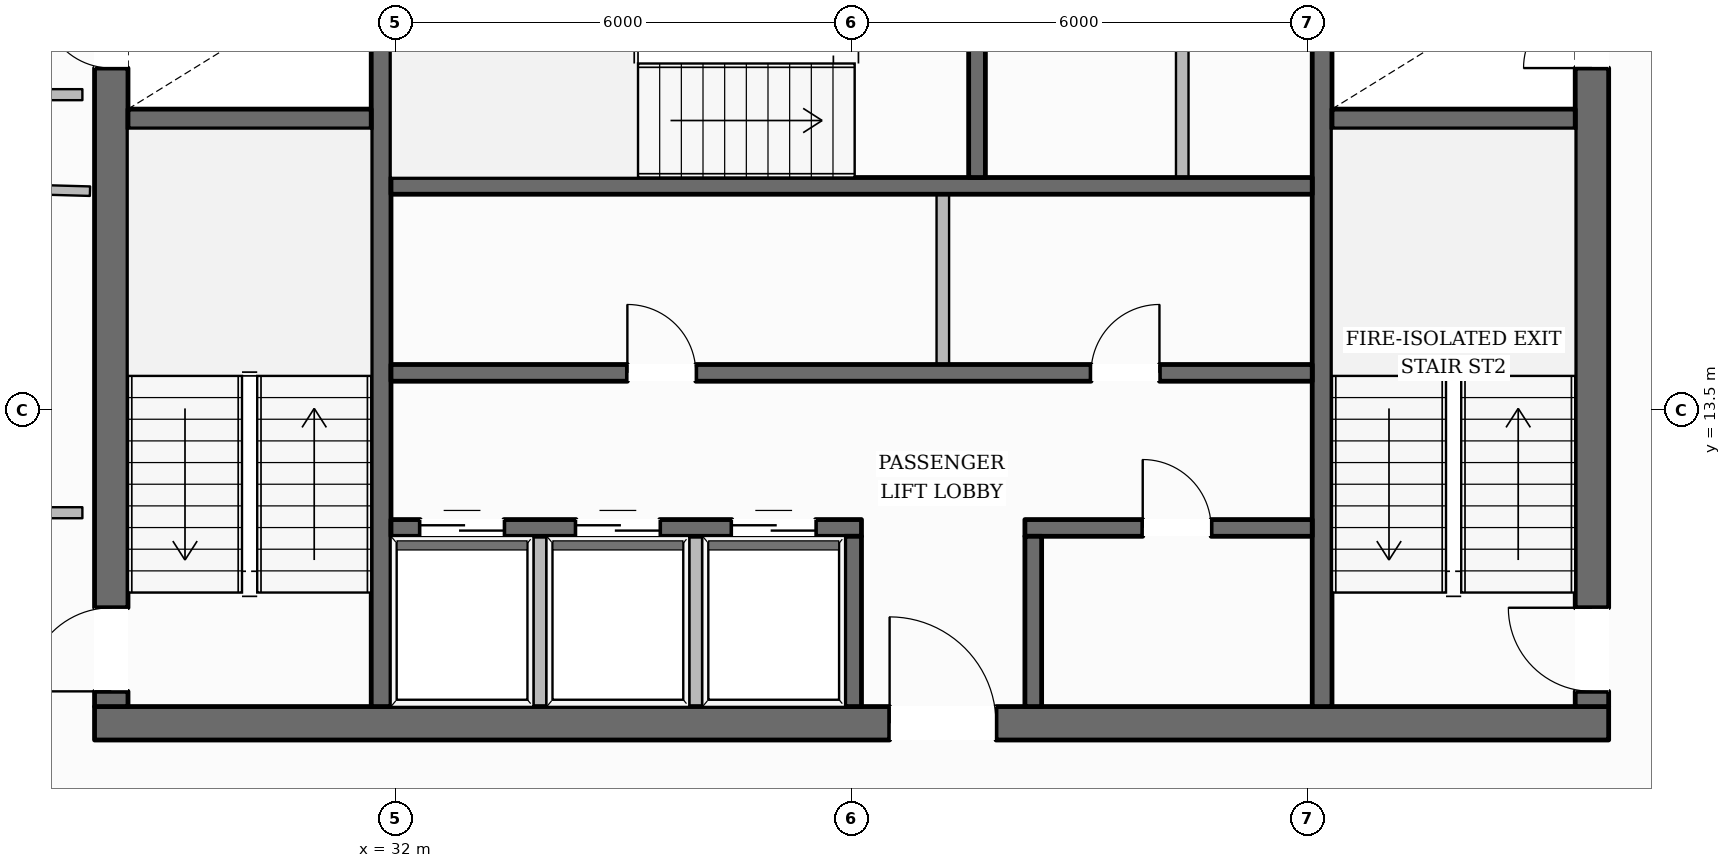
"""IFC4 building model, lengths in metres.
Left out: names, types, materials, properties, quantities, classifications, styles, units other than length and angle.
Written with IfcOpenShell. Run it as: python <this file> out.ifc"""

import sys

from ifc_helpers import new_model, si_unit, direction, frame, frame_2d, origin, place, context, subcontext, project, spatial, rectangle, extrude, element, fill, save


model = new_model("IFC4")
c1 = context("Model", 3, precision=1e-05, world=origin(), true_north=direction((0.0, 1.0)))
c2 = subcontext(c1, "Body", "Model", "MODEL_VIEW")
j1 = project(units=[si_unit("LENGTHUNIT", "METRE"), si_unit("PLANEANGLEUNIT", "RADIAN")], contexts=[c1])
p1 = place(None, origin())
s1 = spatial("IfcSite", under=j1, at=p1, CompositionType="ELEMENT")
p2 = place(p1, origin())
s2 = spatial("IfcBuilding", under=s1, at=p2, CompositionType="ELEMENT")
p3 = place(p2, frame((0.0, 0.0, 222.75)))
s3 = spatial("IfcBuildingStorey", under=s2, at=p3, CompositionType="ELEMENT", Elevation=222.75)
p4 = place(p3, frame((28.04, 9.38, 0.0), z_axis=(0.0, 0.0, 1.0), x_axis=(1.0, 0.0, 0.0)))
e1 = element("IfcWall", 1, at=p4, inside=s3, PredefinedType="SOLIDWALL", context=c2, shape_type="SweptSolid", body=[
    extrude(rectangle(XDim=19.92, YDim=0.44, at=frame_2d((9.96, 0.0))), origin(), (0.0, 0.0, 1.0), 3.6),
])
p5 = place(p4, frame((10.46, 0.0, 0.0)))
e2 = element("IfcOpeningElement", 2, at=p5, cuts=e1, PredefinedType="OPENING", context=c2, shape_type="SweptSolid", body=[
    extrude(rectangle(XDim=1.4, YDim=2.2, at=frame_2d((0.7, 1.1))), frame((0.0, 0.23, 0.0), z_axis=(0.0, -1.0, 0.0), x_axis=(1.0, 0.0, 0.0)), (0.0, 0.0, 1.0), 0.46),
])
p6 = place(p3, frame((28.26, 9.6, 0.0), z_axis=(0.0, 0.0, 1.0), x_axis=(0.0, 1.0, 0.0)))
e3 = element("IfcWall", 3, at=p6, inside=s3, PredefinedType="SOLIDWALL", context=c2, shape_type="SweptSolid", body=[
    extrude(rectangle(XDim=13.0, YDim=0.44, at=frame_2d((6.5, 0.0))), origin(), (0.0, 0.0, 1.0), 3.6),
])
p7 = place(p6, frame((0.2, 0.0, 0.0)))
e4 = element("IfcOpeningElement", 4, at=p7, cuts=e3, PredefinedType="OPENING", context=c2, shape_type="SweptSolid", body=[
    extrude(rectangle(XDim=1.1, YDim=2.15, at=frame_2d((0.55, 1.075))), frame((0.0, 0.23, 0.0), z_axis=(0.0, -1.0, 0.0), x_axis=(1.0, 0.0, 0.0)), (0.0, 0.0, 1.0), 0.46),
])
p8 = place(p6, frame((8.4, 0.0, 0.0)))
e5 = element("IfcOpeningElement", 5, at=p8, cuts=e3, PredefinedType="OPENING", context=c2, shape_type="SweptSolid", body=[
    extrude(rectangle(XDim=0.9, YDim=2.1, at=frame_2d((0.45, 1.05))), frame((0.0, 0.23, 0.0), z_axis=(0.0, -1.0, 0.0), x_axis=(1.0, 0.0, 0.0)), (0.0, 0.0, 1.0), 0.46),
])
p9 = place(p3, frame((47.74, 9.6, 0.0), z_axis=(0.0, 0.0, 1.0), x_axis=(0.0, 1.0, 0.0)))
e6 = element("IfcWall", 6, at=p9, inside=s3, PredefinedType="SOLIDWALL", context=c2, shape_type="SweptSolid", body=[
    extrude(rectangle(XDim=13.0, YDim=0.44, at=frame_2d((6.5, 0.0))), origin(), (0.0, 0.0, 1.0), 3.6),
])
p10 = place(p9, frame((0.2, 0.0, 0.0)))
e7 = element("IfcOpeningElement", 7, at=p10, cuts=e6, PredefinedType="OPENING", context=c2, shape_type="SweptSolid", body=[
    extrude(rectangle(XDim=1.1, YDim=2.15, at=frame_2d((0.55, 1.075))), frame((0.0, 0.23, 0.0), z_axis=(0.0, -1.0, 0.0), x_axis=(1.0, 0.0, 0.0)), (0.0, 0.0, 1.0), 0.46),
])
p11 = place(p9, frame((8.4, 0.0, 0.0)))
e8 = element("IfcOpeningElement", 8, at=p11, cuts=e6, PredefinedType="OPENING", context=c2, shape_type="SweptSolid", body=[
    extrude(rectangle(XDim=0.9, YDim=2.1, at=frame_2d((0.45, 1.05))), frame((0.0, 0.23, 0.0), z_axis=(0.0, -1.0, 0.0), x_axis=(1.0, 0.0, 0.0)), (0.0, 0.0, 1.0), 0.46),
])
p12 = place(p3, frame((31.81, 9.6, 0.0), z_axis=(0.0, 0.0, 1.0), x_axis=(0.0, 1.0, 0.0)))
e9 = element("IfcWall", 9, at=p12, inside=s3, PredefinedType="SHEAR", context=c2, shape_type="SweptSolid", body=[
    extrude(rectangle(XDim=13.0, YDim=0.26, at=frame_2d((6.5, 0.0))), origin(), (0.0, 0.0, 1.0), 3.6),
])
p13 = place(p12, frame((10.925, 0.0, 0.0)))
e10 = element("IfcOpeningElement", 10, at=p13, cuts=e9, PredefinedType="OPENING", context=c2, shape_type="SweptSolid", body=[
    extrude(rectangle(XDim=1.25, YDim=2.25, at=frame_2d((0.625, 1.125))), frame((0.0, 0.14, 0.0), z_axis=(0.0, -1.0, 0.0), x_axis=(1.0, 0.0, 0.0)), (0.0, 0.0, 1.0), 0.28),
])
p14 = place(p3, frame((44.19, 9.6, 0.0), z_axis=(0.0, 0.0, 1.0), x_axis=(0.0, 1.0, 0.0)))
e11 = element("IfcWall", 11, at=p14, inside=s3, PredefinedType="SHEAR", context=c2, shape_type="SweptSolid", body=[
    extrude(rectangle(XDim=13.0, YDim=0.26, at=frame_2d((6.5, 0.0))), origin(), (0.0, 0.0, 1.0), 3.6),
])
p15 = place(p14, frame((10.925, 0.0, 0.0)))
e12 = element("IfcOpeningElement", 12, at=p15, cuts=e11, PredefinedType="OPENING", context=c2, shape_type="SweptSolid", body=[
    extrude(rectangle(XDim=1.25, YDim=2.25, at=frame_2d((0.625, 1.125))), frame((0.0, 0.14, 0.0), z_axis=(0.0, -1.0, 0.0), x_axis=(1.0, 0.0, 0.0)), (0.0, 0.0, 1.0), 0.28),
])
for number, where, z_axis, x_axis in (
    (13, (28.48, 17.33, 0.0), (0.0, 0.0, 1.0), (1.0, 0.0, 0.0)),
    (14, (44.32, 17.33, 0.0), (0.0, 0.0, 1.0), (1.0, 0.0, 0.0)),
):
    element("IfcWall", number, at=place(p3, frame(where, z_axis=z_axis, x_axis=x_axis)), inside=s3, PredefinedType="SHEAR", context=c2, shape_type="SweptSolid", body=[
        extrude(rectangle(XDim=3.2, YDim=0.26, at=frame_2d((1.6, 0.0))), origin(), (0.0, 0.0, 1.0), 3.6),
    ])
p16 = place(p3, frame((31.94, 16.45, 0.0), z_axis=(0.0, 0.0, 1.0), x_axis=(1.0, 0.0, 0.0)))
e15 = element("IfcWall", 15, at=p16, inside=s3, PredefinedType="SOLIDWALL", context=c2, shape_type="SweptSolid", body=[
    extrude(rectangle(XDim=12.12, YDim=0.22, at=frame_2d((6.06, 0.0))), origin(), (0.0, 0.0, 1.0), 3.6),
])
p17 = place(p3, frame((39.65, 16.56, 0.0), z_axis=(0.0, 0.0, 1.0), x_axis=(0.0, 1.0, 0.0)))
e16 = element("IfcWall", 16, at=p17, inside=s3, PredefinedType="SOLIDWALL", context=c2, shape_type="SweptSolid", body=[
    extrude(rectangle(XDim=3.2, YDim=0.22, at=frame_2d((1.6, 0.0))), origin(), (0.0, 0.0, 1.0), 3.6),
])
p18 = place(p3, frame((31.94, 13.99, 0.0), z_axis=(0.0, 0.0, 1.0), x_axis=(1.0, 0.0, 0.0)))
e17 = element("IfcWall", 17, at=p18, inside=s3, PredefinedType="SOLIDWALL", context=c2, shape_type="SweptSolid", body=[
    extrude(rectangle(XDim=12.12, YDim=0.22, at=frame_2d((6.06, 0.0))), origin(), (0.0, 0.0, 1.0), 3.6),
])
p19 = place(p18, frame((3.11, 0.0, 0.0)))
e18 = element("IfcOpeningElement", 18, at=p19, cuts=e17, PredefinedType="OPENING", context=c2, shape_type="SweptSolid", body=[
    extrude(rectangle(XDim=0.9, YDim=2.1, at=frame_2d((0.45, 1.05))), frame((0.0, 0.12, 0.0), z_axis=(0.0, -1.0, 0.0), x_axis=(1.0, 0.0, 0.0)), (0.0, 0.0, 1.0), 0.24),
])
p20 = place(p18, frame((9.21, 0.0, 0.0)))
e19 = element("IfcOpeningElement", 19, at=p20, cuts=e17, PredefinedType="OPENING", context=c2, shape_type="SweptSolid", body=[
    extrude(rectangle(XDim=0.9, YDim=2.1, at=frame_2d((0.45, 1.05))), frame((0.0, 0.12, 0.0), z_axis=(0.0, -1.0, 0.0), x_axis=(1.0, 0.0, 0.0)), (0.0, 0.0, 1.0), 0.24),
])
p21 = place(p3, frame((31.94, 11.95, 0.0), z_axis=(0.0, 0.0, 1.0), x_axis=(1.0, 0.0, 0.0)))
e20 = element("IfcWall", 20, at=p21, inside=s3, PredefinedType="SOLIDWALL", context=c2, shape_type="SweptSolid", body=[
    extrude(rectangle(XDim=6.19, YDim=0.22, at=frame_2d((3.095, 0.0))), origin(), (0.0, 0.0, 1.0), 3.6),
])
p22 = place(p21, frame((0.385, 0.0, 0.0)))
e21 = element("IfcOpeningElement", 21, at=p22, cuts=e20, PredefinedType="OPENING", context=c2, shape_type="SweptSolid", body=[
    extrude(rectangle(XDim=1.1, YDim=2.2, at=frame_2d((0.55, 1.1))), frame((0.0, 0.12, 0.0), z_axis=(0.0, -1.0, 0.0), x_axis=(1.0, 0.0, 0.0)), (0.0, 0.0, 1.0), 0.24),
])
p23 = place(p21, frame((2.435, 0.0, 0.0)))
e22 = element("IfcOpeningElement", 22, at=p23, cuts=e20, PredefinedType="OPENING", context=c2, shape_type="SweptSolid", body=[
    extrude(rectangle(XDim=1.1, YDim=2.2, at=frame_2d((0.55, 1.1))), frame((0.0, 0.12, 0.0), z_axis=(0.0, -1.0, 0.0), x_axis=(1.0, 0.0, 0.0)), (0.0, 0.0, 1.0), 0.24),
])
p24 = place(p21, frame((4.485, 0.0, 0.0)))
e23 = element("IfcOpeningElement", 23, at=p24, cuts=e20, PredefinedType="OPENING", context=c2, shape_type="SweptSolid", body=[
    extrude(rectangle(XDim=1.1, YDim=2.2, at=frame_2d((0.55, 1.1))), frame((0.0, 0.12, 0.0), z_axis=(0.0, -1.0, 0.0), x_axis=(1.0, 0.0, 0.0)), (0.0, 0.0, 1.0), 0.24),
])
p25 = place(p3, frame((40.28, 11.95, 0.0), z_axis=(0.0, 0.0, 1.0), x_axis=(1.0, 0.0, 0.0)))
e24 = element("IfcWall", 24, at=p25, inside=s3, PredefinedType="SOLIDWALL", context=c2, shape_type="SweptSolid", body=[
    extrude(rectangle(XDim=3.78, YDim=0.22, at=frame_2d((1.89, 0.0))), origin(), (0.0, 0.0, 1.0), 3.6),
])
p26 = place(p25, frame((1.55, 0.0, 0.0)))
e25 = element("IfcOpeningElement", 25, at=p26, cuts=e24, PredefinedType="OPENING", context=c2, shape_type="SweptSolid", body=[
    extrude(rectangle(XDim=0.9, YDim=2.1, at=frame_2d((0.45, 1.05))), frame((0.0, 0.12, 0.0), z_axis=(0.0, -1.0, 0.0), x_axis=(1.0, 0.0, 0.0)), (0.0, 0.0, 1.0), 0.24),
])
for number, where, z_axis, x_axis in (
    (26, (38.02, 9.6, 0.0), (0.0, 0.0, 1.0), (0.0, 1.0, 0.0)),
    (27, (40.39, 9.6, 0.0), (0.0, 0.0, 1.0), (0.0, 1.0, 0.0)),
):
    element("IfcWall", number, at=place(p3, frame(where, z_axis=z_axis, x_axis=x_axis)), inside=s3, PredefinedType="SOLIDWALL", context=c2, shape_type="SweptSolid", body=[
        extrude(rectangle(XDim=2.24, YDim=0.22, at=frame_2d((1.12, 0.0))), origin(), (0.0, 0.0, 1.0), 3.6),
    ])
p27 = place(p3, frame((14.274, 10.826, 0.0), z_axis=(0.0, 0.0, 1.0), x_axis=(0.501112789677, 0.865381980412, 0.0)))
e28 = element("IfcWall", 28, at=p27, inside=s3, PredefinedType="STANDARD", context=c2, shape_type="SweptSolid", body=[
    extrude(rectangle(XDim=39.491, YDim=0.35, at=frame_2d((19.745, 0.0))), origin(), (0.0, 0.0, 1.0), 3.132),
])
p28 = place(p27, frame((29.018, 0.0, 0.0)))
e29 = element("IfcOpeningElement", 29, at=p28, cuts=e28, PredefinedType="OPENING", context=c2, shape_type="SweptSolid", body=[
    extrude(rectangle(XDim=1.0, YDim=2.2, at=frame_2d((0.5, 1.1))), frame((0.0, 0.185, 0.0), z_axis=(0.0, -1.0, 0.0), x_axis=(1.0, 0.0, 0.0)), (0.0, 0.0, 1.0), 0.37),
])
p29 = place(p27, frame((35.08, 0.0, 0.65)))
e30 = element("IfcOpeningElement", 30, at=p29, cuts=e28, PredefinedType="OPENING", context=c2, shape_type="SweptSolid", body=[
    extrude(rectangle(XDim=1.45, YDim=1.75, at=frame_2d((0.725, 0.875))), frame((0.0, 0.185, 0.0), z_axis=(0.0, -1.0, 0.0), x_axis=(1.0, 0.0, 0.0)), (0.0, 0.0, 1.0), 0.37),
])
p30 = place(p27, frame((22.233, 0.0, 0.65)))
e31 = element("IfcOpeningElement", 31, at=p30, cuts=e28, PredefinedType="OPENING", context=c2, shape_type="SweptSolid", body=[
    extrude(rectangle(XDim=1.45, YDim=1.75, at=frame_2d((0.725, 0.875))), frame((0.0, 0.185, 0.0), z_axis=(0.0, -1.0, 0.0), x_axis=(1.0, 0.0, 0.0)), (0.0, 0.0, 1.0), 0.37),
])
p31 = place(p27, frame((9.385, 0.0, 0.65)))
e32 = element("IfcOpeningElement", 32, at=p31, cuts=e28, PredefinedType="OPENING", context=c2, shape_type="SweptSolid", body=[
    extrude(rectangle(XDim=1.45, YDim=1.75, at=frame_2d((0.725, 0.875))), frame((0.0, 0.185, 0.0), z_axis=(0.0, -1.0, 0.0), x_axis=(1.0, 0.0, 0.0)), (0.0, 0.0, 1.0), 0.37),
])
p32 = place(p27, frame((2.962, 0.0, 0.65)))
e33 = element("IfcOpeningElement", 33, at=p32, cuts=e28, PredefinedType="OPENING", context=c2, shape_type="SweptSolid", body=[
    extrude(rectangle(XDim=1.45, YDim=1.75, at=frame_2d((0.725, 0.875))), frame((0.0, 0.185, 0.0), z_axis=(0.0, -1.0, 0.0), x_axis=(1.0, 0.0, 0.0)), (0.0, 0.0, 1.0), 0.37),
])
p33 = place(p3, frame((41.804, 45.08, 0.0), z_axis=(0.0, 0.0, 1.0), x_axis=(0.493108750239, -0.869967677812, 0.0)))
e34 = element("IfcWall", 34, at=p33, inside=s3, PredefinedType="STANDARD", context=c2, shape_type="SweptSolid", body=[
    extrude(rectangle(XDim=38.876, YDim=0.35, at=frame_2d((19.438, 0.0))), origin(), (0.0, 0.0, 1.0), 3.132),
])
p34 = place(p33, frame((28.557, 0.0, 0.0)))
e35 = element("IfcOpeningElement", 35, at=p34, cuts=e34, PredefinedType="OPENING", context=c2, shape_type="SweptSolid", body=[
    extrude(rectangle(XDim=1.0, YDim=2.2, at=frame_2d((0.5, 1.1))), frame((0.0, 0.185, 0.0), z_axis=(0.0, -1.0, 0.0), x_axis=(1.0, 0.0, 0.0)), (0.0, 0.0, 1.0), 0.37),
])
p35 = place(p33, frame((34.516, 0.0, 0.65)))
e36 = element("IfcOpeningElement", 36, at=p35, cuts=e34, PredefinedType="OPENING", context=c2, shape_type="SweptSolid", body=[
    extrude(rectangle(XDim=1.45, YDim=1.75, at=frame_2d((0.725, 0.875))), frame((0.0, 0.185, 0.0), z_axis=(0.0, -1.0, 0.0), x_axis=(1.0, 0.0, 0.0)), (0.0, 0.0, 1.0), 0.37),
])
p36 = place(p33, frame((21.876, 0.0, 0.65)))
e37 = element("IfcOpeningElement", 37, at=p36, cuts=e34, PredefinedType="OPENING", context=c2, shape_type="SweptSolid", body=[
    extrude(rectangle(XDim=1.45, YDim=1.75, at=frame_2d((0.725, 0.875))), frame((0.0, 0.185, 0.0), z_axis=(0.0, -1.0, 0.0), x_axis=(1.0, 0.0, 0.0)), (0.0, 0.0, 1.0), 0.37),
])
p37 = place(p33, frame((9.237, 0.0, 0.65)))
e38 = element("IfcOpeningElement", 38, at=p37, cuts=e34, PredefinedType="OPENING", context=c2, shape_type="SweptSolid", body=[
    extrude(rectangle(XDim=1.45, YDim=1.75, at=frame_2d((0.725, 0.875))), frame((0.0, 0.185, 0.0), z_axis=(0.0, -1.0, 0.0), x_axis=(1.0, 0.0, 0.0)), (0.0, 0.0, 1.0), 0.37),
])
p38 = place(p33, frame((2.917, 0.0, 0.65)))
e39 = element("IfcOpeningElement", 39, at=p38, cuts=e34, PredefinedType="OPENING", context=c2, shape_type="SweptSolid", body=[
    extrude(rectangle(XDim=1.45, YDim=1.75, at=frame_2d((0.725, 0.875))), frame((0.0, 0.185, 0.0), z_axis=(0.0, -1.0, 0.0), x_axis=(1.0, 0.0, 0.0)), (0.0, 0.0, 1.0), 0.37),
])
for number, where, z_axis, x_axis in (
    (40, (33.9, 9.52, 0.0), (0.0, 0.0, 1.0), (0.0, 1.0, 0.0)),
    (41, (35.95, 9.52, 0.0), (0.0, 0.0, 1.0), (0.0, 1.0, 0.0)),
):
    element("IfcWall", number, at=place(p3, frame(where, z_axis=z_axis, x_axis=x_axis)), inside=s3, PredefinedType="PARTITIONING", context=c2, shape_type="SweptSolid", body=[
        extrude(rectangle(XDim=2.32, YDim=0.165, at=frame_2d((1.16, 0.0))), origin(), (0.0, 0.0, 1.0), 3.6),
    ])
p39 = place(p3, frame((39.2, 14.1, 0.0), z_axis=(0.0, 0.0, 1.0), x_axis=(0.0, 1.0, 0.0)))
e42 = element("IfcWall", 42, at=p39, inside=s3, PredefinedType="PARTITIONING", context=c2, shape_type="SweptSolid", body=[
    extrude(rectangle(XDim=2.24, YDim=0.165, at=frame_2d((1.12, 0.0))), origin(), (0.0, 0.0, 1.0), 3.6),
])
p40 = place(p3, frame((42.35, 16.56, 0.0), z_axis=(0.0, 0.0, 1.0), x_axis=(0.0, 1.0, 0.0)))
e43 = element("IfcWall", 43, at=p40, inside=s3, PredefinedType="PARTITIONING", context=c2, shape_type="SweptSolid", body=[
    extrude(rectangle(XDim=3.2, YDim=0.165, at=frame_2d((1.6, 0.0))), origin(), (0.0, 0.0, 1.0), 3.6),
])
for number, where, z_axis, x_axis in (
    (44, (27.88, 17.65, 0.0), (0.0, 0.0, 1.0), (-1.0, 0.0, 0.0)),
    (45, (26.06, 12.15, 0.0), (0.0, 0.0, 1.0), (1.0, 0.0, 0.0)),
):
    element("IfcWall", number, at=place(p3, frame(where, z_axis=z_axis, x_axis=x_axis)), inside=s3, PredefinedType="PARTITIONING", context=c2, shape_type="SweptSolid", body=[
        extrude(rectangle(XDim=1.82, YDim=0.145, at=frame_2d((0.91, 0.0))), origin(), (0.0, 0.0, 1.0), 3.6),
    ])
p41 = place(p3, frame((27.98, 16.38, 0.0), z_axis=(0.0, 0.0, 1.0), x_axis=(-0.999608903911, 0.027964964169, 0.0)))
e46 = element("IfcWall", 46, at=p41, inside=s3, PredefinedType="PARTITIONING", context=c2, shape_type="SweptSolid", body=[
    extrude(rectangle(XDim=9.691, YDim=0.125, at=frame_2d((4.845, 0.0))), origin(), (0.0, 0.0, 1.0), 3.141),
])
p42 = place(p7, origin())
e47 = element("IfcDoor", 47, at=p42, inside=s3, OperationType="SINGLE_SWING_LEFT", PredefinedType="DOOR", context=c2, shape_type="SweptSolid", body=[
    extrude(rectangle(XDim=1.1, YDim=2.15, at=frame_2d((0.55, 1.075))), frame((0.0, 0.025, 0.0), z_axis=(0.0, -1.0, 0.0), x_axis=(1.0, 0.0, 0.0)), (0.0, 0.0, 1.0), 0.05),
])
fill(e4, e47)
p43 = place(p10, origin())
e48 = element("IfcDoor", 48, at=p43, inside=s3, OperationType="SINGLE_SWING_RIGHT", PredefinedType="DOOR", context=c2, shape_type="SweptSolid", body=[
    extrude(rectangle(XDim=1.1, YDim=2.15, at=frame_2d((0.55, 1.075))), frame((0.0, 0.025, 0.0), z_axis=(0.0, -1.0, 0.0), x_axis=(1.0, 0.0, 0.0)), (0.0, 0.0, 1.0), 0.05),
])
fill(e7, e48)
p44 = place(p8, origin())
e49 = element("IfcDoor", 49, at=p44, inside=s3, OperationType="SINGLE_SWING_RIGHT", PredefinedType="DOOR", context=c2, shape_type="SweptSolid", body=[
    extrude(rectangle(XDim=0.9, YDim=2.1, at=frame_2d((0.45, 1.05))), frame((0.0, 0.025, 0.0), z_axis=(0.0, -1.0, 0.0), x_axis=(1.0, 0.0, 0.0)), (0.0, 0.0, 1.0), 0.05),
])
fill(e5, e49)
p45 = place(p11, origin())
e50 = element("IfcDoor", 50, at=p45, inside=s3, OperationType="SINGLE_SWING_LEFT", PredefinedType="DOOR", context=c2, shape_type="SweptSolid", body=[
    extrude(rectangle(XDim=0.9, YDim=2.1, at=frame_2d((0.45, 1.05))), frame((0.0, 0.025, 0.0), z_axis=(0.0, -1.0, 0.0), x_axis=(1.0, 0.0, 0.0)), (0.0, 0.0, 1.0), 0.05),
])
fill(e8, e50)
p46 = place(p5, origin())
e51 = element("IfcDoor", 51, at=p46, inside=s3, OperationType="SINGLE_SWING_LEFT", PredefinedType="DOOR", context=c2, shape_type="SweptSolid", body=[
    extrude(rectangle(XDim=1.4, YDim=2.2, at=frame_2d((0.7, 1.1))), frame((0.0, 0.025, 0.0), z_axis=(0.0, -1.0, 0.0), x_axis=(1.0, 0.0, 0.0)), (0.0, 0.0, 1.0), 0.05),
])
fill(e2, e51)
p47 = place(p22, origin())
e52 = element("IfcDoor", 52, at=p47, inside=s3, OperationType="DOUBLE_DOOR_SLIDING", PredefinedType="DOOR", context=c2, shape_type="SweptSolid", body=[
    extrude(rectangle(XDim=1.1, YDim=2.2, at=frame_2d((0.55, 1.1))), frame((0.0, 0.025, 0.0), z_axis=(0.0, -1.0, 0.0), x_axis=(1.0, 0.0, 0.0)), (0.0, 0.0, 1.0), 0.05),
])
fill(e21, e52)
p48 = place(p23, origin())
e53 = element("IfcDoor", 53, at=p48, inside=s3, OperationType="DOUBLE_DOOR_SLIDING", PredefinedType="DOOR", context=c2, shape_type="SweptSolid", body=[
    extrude(rectangle(XDim=1.1, YDim=2.2, at=frame_2d((0.55, 1.1))), frame((0.0, 0.025, 0.0), z_axis=(0.0, -1.0, 0.0), x_axis=(1.0, 0.0, 0.0)), (0.0, 0.0, 1.0), 0.05),
])
fill(e22, e53)
p49 = place(p24, origin())
e54 = element("IfcDoor", 54, at=p49, inside=s3, OperationType="DOUBLE_DOOR_SLIDING", PredefinedType="DOOR", context=c2, shape_type="SweptSolid", body=[
    extrude(rectangle(XDim=1.1, YDim=2.2, at=frame_2d((0.55, 1.1))), frame((0.0, 0.025, 0.0), z_axis=(0.0, -1.0, 0.0), x_axis=(1.0, 0.0, 0.0)), (0.0, 0.0, 1.0), 0.05),
])
fill(e23, e54)
p50 = place(p19, origin())
e55 = element("IfcDoor", 55, at=p50, inside=s3, OperationType="SINGLE_SWING_LEFT", PredefinedType="DOOR", context=c2, shape_type="SweptSolid", body=[
    extrude(rectangle(XDim=0.9, YDim=2.1, at=frame_2d((0.45, 1.05))), frame((0.0, 0.025, 0.0), z_axis=(0.0, -1.0, 0.0), x_axis=(1.0, 0.0, 0.0)), (0.0, 0.0, 1.0), 0.05),
])
fill(e18, e55)
p51 = place(p20, origin())
e56 = element("IfcDoor", 56, at=p51, inside=s3, OperationType="SINGLE_SWING_RIGHT", PredefinedType="DOOR", context=c2, shape_type="SweptSolid", body=[
    extrude(rectangle(XDim=0.9, YDim=2.1, at=frame_2d((0.45, 1.05))), frame((0.0, 0.025, 0.0), z_axis=(0.0, -1.0, 0.0), x_axis=(1.0, 0.0, 0.0)), (0.0, 0.0, 1.0), 0.05),
])
fill(e19, e56)
p52 = place(p26, origin())
e57 = element("IfcDoor", 57, at=p52, inside=s3, OperationType="SINGLE_SWING_LEFT", PredefinedType="DOOR", context=c2, shape_type="SweptSolid", body=[
    extrude(rectangle(XDim=0.9, YDim=2.1, at=frame_2d((0.45, 1.05))), frame((0.0, 0.025, 0.0), z_axis=(0.0, -1.0, 0.0), x_axis=(1.0, 0.0, 0.0)), (0.0, 0.0, 1.0), 0.05),
])
fill(e25, e57)
save(model, sys.argv[1])
